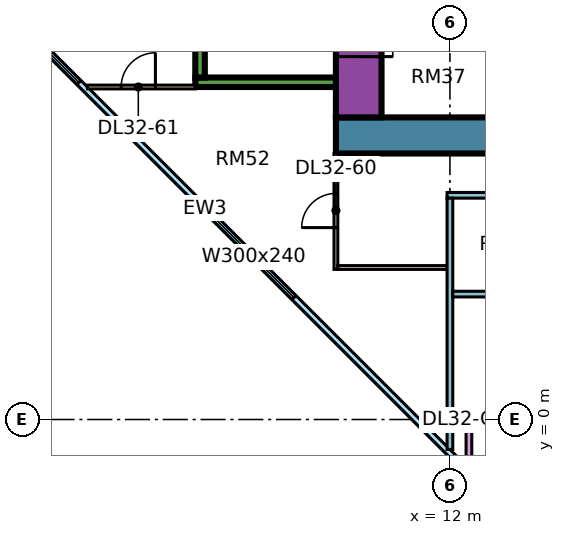
"""IFC4 building model, lengths in metres.
Left out: names, types, materials, properties, quantities, classifications, styles, units other than length and angle.
Written with IfcOpenShell. Run it as: python <this file> out.ifc"""

import sys

from ifc_helpers import new_model, si_unit, direction, frame, frame_2d, origin, place, context, subcontext, project, spatial, rectangle, extrude, element, fill, save


model = new_model("IFC4")
c1 = context("Model", 3, precision=1e-05, world=origin(), true_north=direction((0.0, 1.0)))
c2 = subcontext(c1, "Body", "Model", "MODEL_VIEW")
j1 = project(units=[si_unit("LENGTHUNIT", "METRE"), si_unit("PLANEANGLEUNIT", "RADIAN")], contexts=[c1])
p1 = place(None, origin())
s1 = spatial("IfcSite", under=j1, at=p1, CompositionType="ELEMENT")
p2 = place(p1, origin())
s2 = spatial("IfcBuilding", under=s1, at=p2, CompositionType="ELEMENT")
p3 = place(p2, frame((0.0, 0.0, 136.9)))
s3 = spatial("IfcBuildingStorey", under=s2, at=p3, CompositionType="ELEMENT", Elevation=136.9)
p4 = place(p3, frame((9.0, 7.475, 0.0), z_axis=(0.0, 0.0, 1.0), x_axis=(1.0, 0.0, 0.0)))
e1 = element("IfcWall", 1, at=p4, inside=s3, PredefinedType="SHEAR", context=c2, shape_type="SweptSolid", body=[
    extrude(rectangle(XDim=25.0, YDim=0.95, at=frame_2d((12.5, 0.0))), origin(), (0.0, 0.0, 1.0), 3.75),
])
p5 = place(p3, frame((9.6, 7.95, 0.0), z_axis=(0.0, 0.0, 1.0), x_axis=(0.0, 1.0, 0.0)))
e2 = element("IfcWall", 2, at=p5, inside=s3, PredefinedType="SHEAR", context=c2, shape_type="SweptSolid", body=[
    extrude(rectangle(XDim=11.1, YDim=1.2, at=frame_2d((5.55, 0.0))), origin(), (0.0, 0.0, 1.0), 3.75),
])
p6 = place(p5, frame((3.925, 0.0, 0.0)))
e3 = element("IfcOpeningElement", 3, at=p6, cuts=e2, PredefinedType="OPENING", context=c2, shape_type="SweptSolid", body=[
    extrude(rectangle(XDim=1.1, YDim=2.2, at=frame_2d((0.55, 1.1))), frame((0.0, 0.61, 0.0), z_axis=(0.0, -1.0, 0.0), x_axis=(1.0, 0.0, 0.0)), (0.0, 0.0, 1.0), 1.22),
])
p7 = place(p5, frame((6.425, 0.0, 0.0)))
e4 = element("IfcOpeningElement", 4, at=p7, cuts=e2, PredefinedType="OPENING", context=c2, shape_type="SweptSolid", body=[
    extrude(rectangle(XDim=1.1, YDim=2.2, at=frame_2d((0.55, 1.1))), frame((0.0, 0.61, 0.0), z_axis=(0.0, -1.0, 0.0), x_axis=(1.0, 0.0, 0.0)), (0.0, 0.0, 1.0), 1.22),
])
p8 = place(p5, frame((9.175, 0.0, 0.0)))
e5 = element("IfcOpeningElement", 5, at=p8, cuts=e2, PredefinedType="OPENING", context=c2, shape_type="SweptSolid", body=[
    extrude(rectangle(XDim=1.1, YDim=2.2, at=frame_2d((0.55, 1.1))), frame((0.0, 0.61, 0.0), z_axis=(0.0, -1.0, 0.0), x_axis=(1.0, 0.0, 0.0)), (0.0, 0.0, 1.0), 1.22),
])
p9 = place(p5, frame((1.6, 0.0, 0.0)))
e6 = element("IfcOpeningElement", 6, at=p9, cuts=e2, PredefinedType="OPENING", context=c2, shape_type="SweptSolid", body=[
    extrude(rectangle(XDim=0.9, YDim=2.1, at=frame_2d((0.45, 1.05))), frame((0.0, 0.61, 0.0), z_axis=(0.0, -1.0, 0.0), x_axis=(1.0, 0.0, 0.0)), (0.0, 0.0, 1.0), 1.22),
])
p10 = place(p3, frame((5.3, 8.875, 0.0), z_axis=(0.0, 0.0, 1.0), x_axis=(1.0, 0.0, 0.0)))
e7 = element("IfcWall", 7, at=p10, inside=s3, PredefinedType="SHEAR", context=c2, shape_type="SweptSolid", body=[
    extrude(rectangle(XDim=3.7, YDim=0.25, at=frame_2d((1.85, 0.0))), origin(), (0.0, 0.0, 1.0), 3.75),
])
p11 = place(p3, frame((5.425, 9.0, 0.0), z_axis=(0.0, 0.0, 1.0), x_axis=(0.0, 1.0, 0.0)))
e8 = element("IfcWall", 8, at=p11, inside=s3, PredefinedType="SHEAR", context=c2, shape_type="SweptSolid", body=[
    extrude(rectangle(XDim=4.0, YDim=0.25, at=frame_2d((2.0, 0.0))), origin(), (0.0, 0.0, 1.0), 3.75),
])
p12 = place(p3, frame((-1.447, 12.553, 0.0), z_axis=(0.0, 0.0, 1.0), x_axis=(0.707106781187, -0.707106781187, 0.0)))
e9 = element("IfcWall", 9, at=p12, inside=s3, PredefinedType="SOLIDWALL", context=c2, shape_type="SweptSolid", body=[
    extrude(rectangle(XDim=19.799, YDim=0.15, at=frame_2d((9.899, 0.0))), origin(), (0.0, 0.0, 1.0), 3.3),
])
p13 = place(p12, frame((2.212, 0.0, 0.45)))
e10 = element("IfcOpeningElement", 10, at=p13, cuts=e9, PredefinedType="OPENING", context=c2, shape_type="SweptSolid", body=[
    extrude(rectangle(XDim=3.0, YDim=2.4, at=frame_2d((1.5, 1.2))), frame((0.0, 0.085, 0.0), z_axis=(0.0, -1.0, 0.0), x_axis=(1.0, 0.0, 0.0)), (0.0, 0.0, 1.0), 0.17),
])
p14 = place(p12, frame((10.216, 0.0, 0.45)))
e11 = element("IfcOpeningElement", 11, at=p14, cuts=e9, PredefinedType="OPENING", context=c2, shape_type="SweptSolid", body=[
    extrude(rectangle(XDim=3.0, YDim=2.4, at=frame_2d((1.5, 1.2))), frame((0.0, 0.085, 0.0), z_axis=(0.0, -1.0, 0.0), x_axis=(1.0, 0.0, 0.0)), (0.0, 0.0, 1.0), 0.17),
])
p15 = place(p3, frame((12.575, 0.0, 0.0), z_axis=(0.0, 0.0, 1.0), x_axis=(1.0, 0.0, 0.0)))
e12 = element("IfcWall", 12, at=p15, inside=s3, PredefinedType="SOLIDWALL", context=c2, shape_type="SweptSolid", body=[
    extrude(rectangle(XDim=11.35, YDim=0.15, at=frame_2d((5.675, 0.0))), origin(), (0.0, 0.0, 1.0), 3.3),
])
p16 = place(p15, frame((1.812, 0.0, 0.0)))
e13 = element("IfcOpeningElement", 13, at=p16, cuts=e12, PredefinedType="OPENING", context=c2, shape_type="SweptSolid", body=[
    extrude(rectangle(XDim=1.8, YDim=2.4, at=frame_2d((0.9, 1.2))), frame((0.0, 0.085, 0.0), z_axis=(0.0, -1.0, 0.0), x_axis=(1.0, 0.0, 0.0)), (0.0, 0.0, 1.0), 0.17),
])
p17 = place(p15, frame((6.625, 0.0, 0.45)))
e14 = element("IfcOpeningElement", 14, at=p17, cuts=e12, PredefinedType="OPENING", context=c2, shape_type="SweptSolid", body=[
    extrude(rectangle(XDim=3.0, YDim=2.4, at=frame_2d((1.5, 1.2))), frame((0.0, 0.085, 0.0), z_axis=(0.0, -1.0, 0.0), x_axis=(1.0, 0.0, 0.0)), (0.0, 0.0, 1.0), 0.17),
])
p18 = place(p3, frame((12.5, -1.5, 0.0), z_axis=(0.0, 0.0, 1.0), x_axis=(0.0, 1.0, 0.0)))
e15 = element("IfcWall", 15, at=p18, inside=s3, PredefinedType="SOLIDWALL", context=c2, shape_type="SweptSolid", body=[
    extrude(rectangle(XDim=1.5, YDim=0.15, at=frame_2d((0.75, 0.0))), origin(), (0.0, 0.0, 1.0), 3.3),
])
p19 = place(p3, frame((2.461, 8.75, 0.0), z_axis=(0.0, 0.0, 1.0), x_axis=(1.0, 0.0, 0.0)))
e16 = element("IfcWall", 16, at=p19, inside=s3, PredefinedType="PARTITIONING", context=c2, shape_type="SweptSolid", body=[
    extrude(rectangle(XDim=2.839, YDim=0.1, at=frame_2d((1.419, 0.0))), origin(), (0.0, 0.0, 1.0), 3.3),
])
p20 = place(p19, frame((0.889, 0.0, 0.0)))
e17 = element("IfcOpeningElement", 17, at=p20, cuts=e16, PredefinedType="OPENING", context=c2, shape_type="SweptSolid", body=[
    extrude(rectangle(XDim=0.9, YDim=2.1, at=frame_2d((0.45, 1.05))), frame((0.0, 0.06, 0.0), z_axis=(0.0, -1.0, 0.0), x_axis=(1.0, 0.0, 0.0)), (0.0, 0.0, 1.0), 0.12),
])
p21 = place(p3, frame((9.0, 3.95, 0.0), z_axis=(0.0, 0.0, 1.0), x_axis=(0.0, 1.0, 0.0)))
e18 = element("IfcWall", 18, at=p21, inside=s3, PredefinedType="PARTITIONING", context=c2, shape_type="SweptSolid", body=[
    extrude(rectangle(XDim=3.05, YDim=0.1, at=frame_2d((1.525, 0.0))), origin(), (0.0, 0.0, 1.0), 3.3),
])
p22 = place(p21, frame((1.1, 0.0, 0.0)))
e19 = element("IfcOpeningElement", 19, at=p22, cuts=e18, PredefinedType="OPENING", context=c2, shape_type="SweptSolid", body=[
    extrude(rectangle(XDim=0.9, YDim=2.1, at=frame_2d((0.45, 1.05))), frame((0.0, 0.06, 0.0), z_axis=(0.0, -1.0, 0.0), x_axis=(1.0, 0.0, 0.0)), (0.0, 0.0, 1.0), 0.12),
])
p23 = place(p3, frame((9.05, 4.0, 0.0), z_axis=(0.0, 0.0, 1.0), x_axis=(1.0, 0.0, 0.0)))
e20 = element("IfcWall", 20, at=p23, inside=s3, PredefinedType="PARTITIONING", context=c2, shape_type="SweptSolid", body=[
    extrude(rectangle(XDim=2.875, YDim=0.1, at=frame_2d((1.438, 0.0))), origin(), (0.0, 0.0, 1.0), 3.3),
])
p24 = place(p3, frame((11.925, 5.9, 0.0), z_axis=(0.0, 0.0, 1.0), x_axis=(1.0, 0.0, 0.0)))
e21 = element("IfcWall", 21, at=p24, inside=s3, PredefinedType="PARTITIONING", context=c2, shape_type="SweptSolid", body=[
    extrude(rectangle(XDim=21.125, YDim=0.15, at=frame_2d((10.562, 0.0))), origin(), (0.0, 0.0, 1.0), 3.3),
])
p25 = place(p24, frame((16.125, 0.0, 0.0)))
e22 = element("IfcOpeningElement", 22, at=p25, cuts=e21, PredefinedType="OPENING", context=c2, shape_type="SweptSolid", body=[
    extrude(rectangle(XDim=0.9, YDim=2.1, at=frame_2d((0.45, 1.05))), frame((0.0, 0.085, 0.0), z_axis=(0.0, -1.0, 0.0), x_axis=(1.0, 0.0, 0.0)), (0.0, 0.0, 1.0), 0.17),
])
p26 = place(p24, frame((4.125, 0.0, 0.0)))
e23 = element("IfcOpeningElement", 23, at=p26, cuts=e21, PredefinedType="OPENING", context=c2, shape_type="SweptSolid", body=[
    extrude(rectangle(XDim=0.9, YDim=2.1, at=frame_2d((0.45, 1.05))), frame((0.0, 0.085, 0.0), z_axis=(0.0, -1.0, 0.0), x_axis=(1.0, 0.0, 0.0)), (0.0, 0.0, 1.0), 0.17),
])
p27 = place(p24, frame((10.125, 0.0, 0.0)))
e24 = element("IfcOpeningElement", 24, at=p27, cuts=e21, PredefinedType="OPENING", context=c2, shape_type="SweptSolid", body=[
    extrude(rectangle(XDim=0.9, YDim=2.1, at=frame_2d((0.45, 1.05))), frame((0.0, 0.085, 0.0), z_axis=(0.0, -1.0, 0.0), x_axis=(1.0, 0.0, 0.0)), (0.0, 0.0, 1.0), 0.17),
])
p28 = place(p3, frame((12.0, -0.788, 0.0), z_axis=(0.0, 0.0, 1.0), x_axis=(0.0, 1.0, 0.0)))
e25 = element("IfcWall", 25, at=p28, inside=s3, PredefinedType="PARTITIONING", context=c2, shape_type="SweptSolid", body=[
    extrude(rectangle(XDim=6.613, YDim=0.15, at=frame_2d((3.306, 0.0))), origin(), (0.0, 0.0, 1.0), 3.3),
])
p29 = place(p3, frame((12.075, 3.3, 0.0), z_axis=(0.0, 0.0, 1.0), x_axis=(1.0, 0.0, 0.0)))
e26 = element("IfcWall", 26, at=p29, inside=s3, PredefinedType="PARTITIONING", context=c2, shape_type="SweptSolid", body=[
    extrude(rectangle(XDim=3.0, YDim=0.15, at=frame_2d((1.5, 0.0))), origin(), (0.0, 0.0, 1.0), 3.3),
])
p30 = place(p13, origin())
e27 = element("IfcWindow", 27, at=p30, inside=s3, PartitioningType="SINGLE_PANEL", PredefinedType="WINDOW", context=c2, shape_type="SweptSolid", body=[
    extrude(rectangle(XDim=3.0, YDim=2.4, at=frame_2d((1.5, 1.2))), frame((0.0, 0.03, 0.0), z_axis=(0.0, -1.0, 0.0), x_axis=(1.0, 0.0, 0.0)), (0.0, 0.0, 1.0), 0.06),
])
fill(e10, e27)
p31 = place(p14, origin())
e28 = element("IfcWindow", 28, at=p31, inside=s3, PartitioningType="SINGLE_PANEL", PredefinedType="WINDOW", context=c2, shape_type="SweptSolid", body=[
    extrude(rectangle(XDim=3.0, YDim=2.4, at=frame_2d((1.5, 1.2))), frame((0.0, 0.03, 0.0), z_axis=(0.0, -1.0, 0.0), x_axis=(1.0, 0.0, 0.0)), (0.0, 0.0, 1.0), 0.06),
])
fill(e11, e28)
p32 = place(p9, frame((0.9, 0.0, 0.0), z_axis=(0.0, 0.0, 1.0), x_axis=(-1.0, 0.0, 0.0)))
e29 = element("IfcDoor", 29, at=p32, inside=s3, OperationType="SINGLE_SWING_LEFT", PredefinedType="DOOR", context=c2, shape_type="SweptSolid", body=[
    extrude(rectangle(XDim=0.9, YDim=2.1, at=frame_2d((0.45, 1.05))), frame((0.0, 0.025, 0.0), z_axis=(0.0, -1.0, 0.0), x_axis=(1.0, 0.0, 0.0)), (0.0, 0.0, 1.0), 0.05),
])
fill(e6, e29)
p33 = place(p22, origin())
e30 = element("IfcDoor", 30, at=p33, inside=s3, OperationType="SINGLE_SWING_LEFT", PredefinedType="DOOR", context=c2, shape_type="SweptSolid", body=[
    extrude(rectangle(XDim=0.9, YDim=2.1, at=frame_2d((0.45, 1.05))), frame((0.0, 0.025, 0.0), z_axis=(0.0, -1.0, 0.0), x_axis=(1.0, 0.0, 0.0)), (0.0, 0.0, 1.0), 0.05),
])
fill(e19, e30)
p34 = place(p20, frame((0.9, 0.0, 0.0), z_axis=(0.0, 0.0, 1.0), x_axis=(-1.0, 0.0, 0.0)))
e31 = element("IfcDoor", 31, at=p34, inside=s3, OperationType="SINGLE_SWING_RIGHT", PredefinedType="DOOR", context=c2, shape_type="SweptSolid", body=[
    extrude(rectangle(XDim=0.9, YDim=2.1, at=frame_2d((0.45, 1.05))), frame((0.0, 0.025, 0.0), z_axis=(0.0, -1.0, 0.0), x_axis=(1.0, 0.0, 0.0)), (0.0, 0.0, 1.0), 0.05),
])
fill(e17, e31)
save(model, sys.argv[1])
